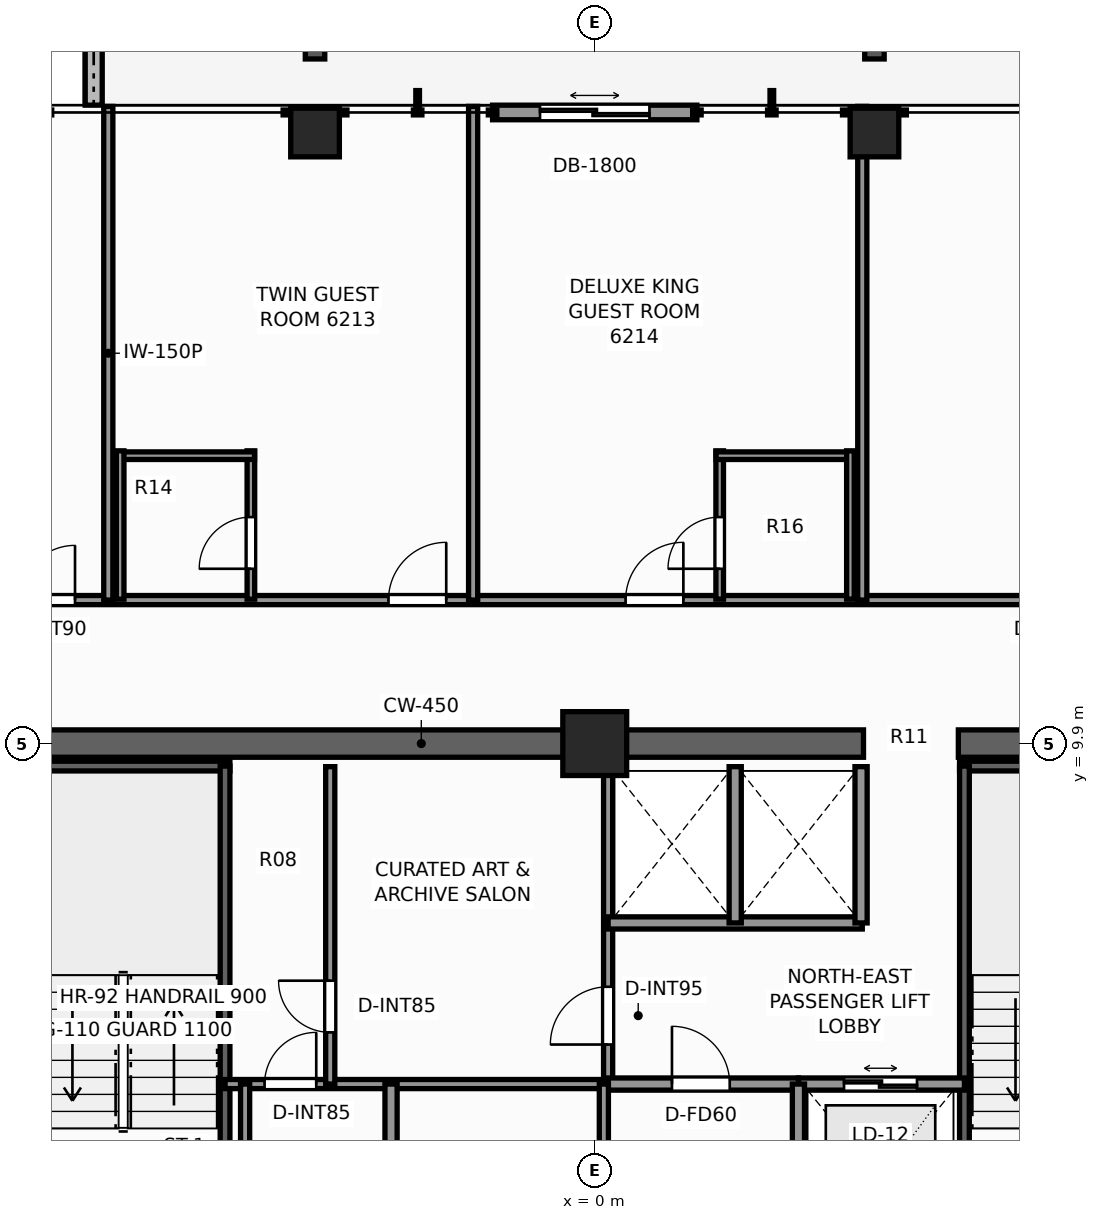
"""IFC4 building model, lengths in metres.
Left out: names, types, materials, properties, quantities, classifications, styles, units other than length and angle.
Written with IfcOpenShell. Run it as: python <this file> out.ifc"""

import sys

from ifc_helpers import new_model, si_unit, direction, frame, frame_2d, origin, origin_2d, place, context, subcontext, project, spatial, rectangle, extrude, element, fill, save


model = new_model("IFC4")
c1 = context("Model", 3, precision=1e-05, world=origin(), true_north=direction((0.0, 1.0)))
c2 = subcontext(c1, "Body", "Model", "MODEL_VIEW")
j1 = project(units=[si_unit("LENGTHUNIT", "METRE"), si_unit("PLANEANGLEUNIT", "RADIAN")], contexts=[c1])
p1 = place(None, origin())
s1 = spatial("IfcSite", under=j1, at=p1, CompositionType="ELEMENT")
p2 = place(p1, origin())
s2 = spatial("IfcBuilding", under=s1, at=p2, CompositionType="ELEMENT")
p3 = place(p2, frame((0.0, 0.0, 213.0)))
s3 = spatial("IfcBuildingStorey", under=s2, at=p3, CompositionType="ELEMENT", Elevation=213.0)
p4 = place(p3, frame((-10.125, 9.9, 0.0), z_axis=(0.0, 0.0, 1.0), x_axis=(1.0, 0.0, 0.0)))
e1 = element("IfcWall", 1, at=p4, inside=s3, PredefinedType="SHEAR", context=c2, shape_type="SweptSolid", body=[
    extrude(rectangle(XDim=14.545, YDim=0.45, at=frame_2d((7.272, 0.0))), origin(), (0.0, 0.0, 1.0), 3.3),
])
p5 = place(p3, frame((5.98, 9.9, 0.0), z_axis=(0.0, 0.0, 1.0), x_axis=(1.0, 0.0, 0.0)))
e2 = element("IfcWall", 2, at=p5, inside=s3, PredefinedType="SHEAR", context=c2, shape_type="SweptSolid", body=[
    extrude(rectangle(XDim=4.145, YDim=0.45, at=frame_2d((2.073, 0.0))), origin(), (0.0, 0.0, 1.0), 3.3),
])
p6 = place(p3, frame((0.0, 9.9, 0.0), z_axis=(0.0, 0.0, 1.0), x_axis=(1.0, 0.0, 0.0)))
e3 = element("IfcColumn", 3, at=p6, inside=s3, PredefinedType="COLUMN", context=c2, shape_type="SweptSolid", body=[
    extrude(rectangle(XDim=1.05, YDim=1.05, at=origin_2d()), origin(), (0.0, 0.0, 1.0), 3.3),
])
for number, where, z_axis, x_axis in (
    (4, (-4.6, 19.95, 0.0), (0.0, 0.0, 1.0), (1.0, 0.0, 0.0)),
    (5, (4.6, 19.95, 0.0), (0.0, 0.0, 1.0), (1.0, 0.0, 0.0)),
):
    element("IfcColumn", number, at=place(p3, frame(where, z_axis=z_axis, x_axis=x_axis)), inside=s3, PredefinedType="COLUMN", context=c2, shape_type="SweptSolid", body=[
        extrude(rectangle(XDim=0.8, YDim=0.8, at=origin_2d()), origin(), (0.0, 0.0, 1.0), 3.3),
    ])
p7 = place(p3, frame((-8.24, 23.375, -0.04), z_axis=(0.0, 0.0, 1.0), x_axis=(0.0, -1.0, 0.0)))
e6 = element("IfcWall", 6, at=p7, inside=s3, PredefinedType="PARAPET", context=c2, shape_type="SweptSolid", body=[
    extrude(rectangle(XDim=2.975, YDim=0.28, at=frame_2d((1.487, 0.0))), origin(), (0.0, 0.0, 1.0), 0.42),
])
p8 = place(p3, frame((-1.68, 20.28, 0.0), z_axis=(0.0, 0.0, 1.0), x_axis=(1.0, 0.0, 0.0)))
e7 = element("IfcWall", 7, at=p8, inside=s3, PredefinedType="STANDARD", context=c2, shape_type="SweptSolid", body=[
    extrude(rectangle(XDim=3.36, YDim=0.24, at=frame_2d((1.68, 0.0))), origin(), (0.0, 0.0, 1.0), 3.08),
])
p9 = place(p8, frame((0.78, 0.0, 0.0)))
e8 = element("IfcOpeningElement", 8, at=p9, cuts=e7, PredefinedType="OPENING", context=c2, shape_type="SweptSolid", body=[
    extrude(rectangle(XDim=1.8, YDim=2.2, at=frame_2d((0.9, 1.1))), frame((0.0, 0.13, 0.0), z_axis=(0.0, -1.0, 0.0), x_axis=(1.0, 0.0, 0.0)), (0.0, 0.0, 1.0), 0.26),
])
p10 = place(p3, frame((-9.52, 9.53, 0.0), z_axis=(0.0, 0.0, 1.0), x_axis=(1.0, 0.0, 0.0)))
e9 = element("IfcWall", 9, at=p10, inside=s3, PredefinedType="SHEAR", context=c2, shape_type="SweptSolid", body=[
    extrude(rectangle(XDim=3.52, YDim=0.16, at=frame_2d((1.76, 0.0))), origin(), (0.0, 0.0, 1.0), 3.3),
])
p11 = place(p3, frame((-6.08, 1.97, 0.0), z_axis=(0.0, 0.0, 1.0), x_axis=(0.0, 1.0, 0.0)))
e10 = element("IfcWall", 10, at=p11, inside=s3, PredefinedType="SHEAR", context=c2, shape_type="SweptSolid", body=[
    extrude(rectangle(XDim=7.56, YDim=0.16, at=frame_2d((3.78, 0.0))), origin(), (0.0, 0.0, 1.0), 3.3),
])
p12 = place(p3, frame((6.0, 9.53, 0.0), z_axis=(0.0, 0.0, 1.0), x_axis=(1.0, 0.0, 0.0)))
e11 = element("IfcWall", 11, at=p12, inside=s3, PredefinedType="SHEAR", context=c2, shape_type="SweptSolid", body=[
    extrude(rectangle(XDim=3.52, YDim=0.16, at=frame_2d((1.76, 0.0))), origin(), (0.0, 0.0, 1.0), 3.3),
])
p13 = place(p3, frame((6.08, 1.97, 0.0), z_axis=(0.0, 0.0, 1.0), x_axis=(0.0, 1.0, 0.0)))
e12 = element("IfcWall", 12, at=p13, inside=s3, PredefinedType="SHEAR", context=c2, shape_type="SweptSolid", body=[
    extrude(rectangle(XDim=7.56, YDim=0.16, at=frame_2d((3.78, 0.0))), origin(), (0.0, 0.0, 1.0), 3.3),
])
p14 = place(p3, frame((3.35, 4.3, 0.0), z_axis=(0.0, 0.0, 1.0), x_axis=(1.0, 0.0, 0.0)))
e13 = element("IfcWall", 13, at=p14, inside=s3, PredefinedType="SOLIDWALL", context=c2, shape_type="SweptSolid", body=[
    extrude(rectangle(XDim=2.73, YDim=0.2, at=frame_2d((1.365, 0.0))), origin(), (0.0, 0.0, 1.0), 3.08),
])
p15 = place(p14, frame((0.75, 0.0, 0.0)))
e14 = element("IfcOpeningElement", 14, at=p15, cuts=e13, PredefinedType="OPENING", context=c2, shape_type="SweptSolid", body=[
    extrude(rectangle(XDim=1.2, YDim=2.25, at=frame_2d((0.6, 1.125))), frame((0.0, 0.11, 0.0), z_axis=(0.0, -1.0, 0.0), x_axis=(1.0, 0.0, 0.0)), (0.0, 0.0, 1.0), 0.22),
])
p16 = place(p3, frame((-6.08, 4.3, 0.0), z_axis=(0.0, 0.0, 1.0), x_axis=(1.0, 0.0, 0.0)))
e15 = element("IfcWall", 15, at=p16, inside=s3, PredefinedType="PARTITIONING", context=c2, shape_type="SweptSolid", body=[
    extrude(rectangle(XDim=6.3, YDim=0.15, at=frame_2d((3.15, 0.0))), origin(), (0.0, 0.0, 1.0), 3.08),
])
p17 = place(p16, frame((0.65, 0.0, 0.0)))
e16 = element("IfcOpeningElement", 16, at=p17, cuts=e15, PredefinedType="OPENING", context=c2, shape_type="SweptSolid", body=[
    extrude(rectangle(XDim=0.85, YDim=2.03, at=frame_2d((0.425, 1.015))), frame((0.0, 0.085, 0.0), z_axis=(0.0, -1.0, 0.0), x_axis=(1.0, 0.0, 0.0)), (0.0, 0.0, 1.0), 0.17),
])
p18 = place(p3, frame((0.22, 4.3, 0.0), z_axis=(0.0, 0.0, 1.0), x_axis=(0.0, 1.0, 0.0)))
e17 = element("IfcWall", 17, at=p18, inside=s3, PredefinedType="PARTITIONING", context=c2, shape_type="SweptSolid", body=[
    extrude(rectangle(XDim=5.22, YDim=0.15, at=frame_2d((2.61, 0.0))), origin(), (0.0, 0.0, 1.0), 3.08),
])
p19 = place(p18, frame((0.65, 0.0, 0.0)))
e18 = element("IfcOpeningElement", 18, at=p19, cuts=e17, PredefinedType="OPENING", context=c2, shape_type="SweptSolid", body=[
    extrude(rectangle(XDim=0.95, YDim=2.06, at=frame_2d((0.475, 1.03))), frame((0.0, 0.085, 0.0), z_axis=(0.0, -1.0, 0.0), x_axis=(1.0, 0.0, 0.0)), (0.0, 0.0, 1.0), 0.17),
])
p20 = place(p3, frame((-4.35, 4.3, 0.0), z_axis=(0.0, 0.0, 1.0), x_axis=(0.0, 1.0, 0.0)))
e19 = element("IfcWall", 19, at=p20, inside=s3, PredefinedType="PARTITIONING", context=c2, shape_type="SweptSolid", body=[
    extrude(rectangle(XDim=5.22, YDim=0.15, at=frame_2d((2.61, 0.0))), origin(), (0.0, 0.0, 1.0), 3.08),
])
p21 = place(p20, frame((0.85, 0.0, 0.0)))
e20 = element("IfcOpeningElement", 20, at=p21, cuts=e19, PredefinedType="OPENING", context=c2, shape_type="SweptSolid", body=[
    extrude(rectangle(XDim=0.85, YDim=2.03, at=frame_2d((0.425, 1.015))), frame((0.0, 0.085, 0.0), z_axis=(0.0, -1.0, 0.0), x_axis=(1.0, 0.0, 0.0)), (0.0, 0.0, 1.0), 0.17),
])
p22 = place(p3, frame((0.22, 6.95, 0.0), z_axis=(0.0, 0.0, 1.0), x_axis=(1.0, 0.0, 0.0)))
e21 = element("IfcWall", 21, at=p22, inside=s3, PredefinedType="SOLIDWALL", context=c2, shape_type="SweptSolid", body=[
    extrude(rectangle(XDim=4.18, YDim=0.2, at=frame_2d((2.09, 0.0))), origin(), (0.0, 0.0, 1.0), 3.08),
])
for number, where, z_axis, x_axis in (
    (22, (4.38, 6.95, 0.0), (0.0, 0.0, 1.0), (0.0, 1.0, 0.0)),
    (23, (2.31, 6.95, 0.0), (0.0, 0.0, 1.0), (0.0, 1.0, 0.0)),
):
    element("IfcWall", number, at=place(p3, frame(where, z_axis=z_axis, x_axis=x_axis)), inside=s3, PredefinedType="SOLIDWALL", context=c2, shape_type="SweptSolid", body=[
        extrude(rectangle(XDim=2.57, YDim=0.2, at=frame_2d((1.285, 0.0))), origin(), (0.0, 0.0, 1.0), 3.08),
    ])
p23 = place(p3, frame((0.22, 4.3, 0.0), z_axis=(0.0, 0.0, 1.0), x_axis=(1.0, 0.0, 0.0)))
e24 = element("IfcWall", 24, at=p23, inside=s3, PredefinedType="SOLIDWALL", context=c2, shape_type="SweptSolid", body=[
    extrude(rectangle(XDim=3.13, YDim=0.2, at=frame_2d((1.565, 0.0))), origin(), (0.0, 0.0, 1.0), 3.08),
])
p24 = place(p23, frame((1.05, 0.0, 0.0)))
e25 = element("IfcOpeningElement", 25, at=p24, cuts=e24, PredefinedType="OPENING", context=c2, shape_type="SweptSolid", body=[
    extrude(rectangle(XDim=0.95, YDim=2.06, at=frame_2d((0.475, 1.03))), frame((0.0, 0.11, 0.0), z_axis=(0.0, -1.0, 0.0), x_axis=(1.0, 0.0, 0.0)), (0.0, 0.0, 1.0), 0.22),
])
for number, where, z_axis, x_axis in (
    (26, (-3.35, 1.1, 0.0), (0.0, 0.0, 1.0), (0.0, 1.0, 0.0)),
    (27, (3.35, 1.1, 0.0), (0.0, 0.0, 1.0), (0.0, 1.0, 0.0)),
):
    element("IfcWall", number, at=place(p3, frame(where, z_axis=z_axis, x_axis=x_axis)), inside=s3, PredefinedType="SOLIDWALL", context=c2, shape_type="SweptSolid", body=[
        extrude(rectangle(XDim=3.2, YDim=0.2, at=frame_2d((1.6, 0.0))), origin(), (0.0, 0.0, 1.0), 3.08),
    ])
p25 = place(p3, frame((0.15, -1.7, 0.0), z_axis=(0.0, 0.0, 1.0), x_axis=(0.0, 1.0, 0.0)))
e28 = element("IfcWall", 28, at=p25, inside=s3, PredefinedType="PARTITIONING", context=c2, shape_type="SweptSolid", body=[
    extrude(rectangle(XDim=6.0, YDim=0.15, at=frame_2d((3.0, 0.0))), origin(), (0.0, 0.0, 1.0), 3.08),
])
p26 = place(p25, frame((3.6, 0.0, 0.0)))
e29 = element("IfcOpeningElement", 29, at=p26, cuts=e28, PredefinedType="OPENING", context=c2, shape_type="SweptSolid", body=[
    extrude(rectangle(XDim=0.85, YDim=2.03, at=frame_2d((0.425, 1.015))), frame((0.0, 0.085, 0.0), z_axis=(0.0, -1.0, 0.0), x_axis=(1.0, 0.0, 0.0)), (0.0, 0.0, 1.0), 0.17),
])
p27 = place(p3, frame((-5.75, 1.97, 0.0), z_axis=(0.0, 0.0, 1.0), x_axis=(0.0, 1.0, 0.0)))
e30 = element("IfcWall", 30, at=p27, inside=s3, PredefinedType="PARTITIONING", context=c2, shape_type="SweptSolid", body=[
    extrude(rectangle(XDim=2.33, YDim=0.15, at=frame_2d((1.165, 0.0))), origin(), (0.0, 0.0, 1.0), 3.08),
])
p28 = place(p3, frame((-12.58, 12.26, 0.0), z_axis=(0.0, 0.0, 1.0), x_axis=(1.0, 0.0, 0.0)))
e31 = element("IfcWall", 31, at=p28, inside=s3, PredefinedType="PARTITIONING", context=c2, shape_type="SweptSolid", body=[
    extrude(rectangle(XDim=25.16, YDim=0.15, at=frame_2d((12.58, 0.0))), origin(), (0.0, 0.0, 1.0), 2.369),
])
p29 = place(p28, frame((3.133, 0.0, 0.0)))
e32 = element("IfcOpeningElement", 32, at=p29, cuts=e31, PredefinedType="OPENING", context=c2, shape_type="SweptSolid", body=[
    extrude(rectangle(XDim=0.9, YDim=2.06, at=frame_2d((0.45, 1.03))), frame((0.0, 0.085, 0.0), z_axis=(0.0, -1.0, 0.0), x_axis=(1.0, 0.0, 0.0)), (0.0, 0.0, 1.0), 0.17),
])
p30 = place(p28, frame((9.188, 0.0, 0.0)))
e33 = element("IfcOpeningElement", 33, at=p30, cuts=e31, PredefinedType="OPENING", context=c2, shape_type="SweptSolid", body=[
    extrude(rectangle(XDim=0.95, YDim=2.06, at=frame_2d((0.475, 1.03))), frame((0.0, 0.085, 0.0), z_axis=(0.0, -1.0, 0.0), x_axis=(1.0, 0.0, 0.0)), (0.0, 0.0, 1.0), 0.17),
])
p31 = place(p28, frame((13.087, 0.0, 0.0)))
e34 = element("IfcOpeningElement", 34, at=p31, cuts=e31, PredefinedType="OPENING", context=c2, shape_type="SweptSolid", body=[
    extrude(rectangle(XDim=0.95, YDim=2.06, at=frame_2d((0.475, 1.03))), frame((0.0, 0.085, 0.0), z_axis=(0.0, -1.0, 0.0), x_axis=(1.0, 0.0, 0.0)), (0.0, 0.0, 1.0), 0.17),
])
p32 = place(p28, frame((19.665, 0.0, 0.0)))
e35 = element("IfcOpeningElement", 35, at=p32, cuts=e31, PredefinedType="OPENING", context=c2, shape_type="SweptSolid", body=[
    extrude(rectangle(XDim=0.9, YDim=2.06, at=frame_2d((0.45, 1.03))), frame((0.0, 0.085, 0.0), z_axis=(0.0, -1.0, 0.0), x_axis=(1.0, 0.0, 0.0)), (0.0, 0.0, 1.0), 0.17),
])
for number, where, z_axis, x_axis in (
    (36, (-8.0, 12.26, 0.0), (0.0, 0.0, 1.0), (0.0, 1.0, 0.0)),
    (37, (-2.0, 12.26, 0.0), (0.0, 0.0, 1.0), (0.0, 1.0, 0.0)),
):
    element("IfcWall", number, at=place(p3, frame(where, z_axis=z_axis, x_axis=x_axis)), inside=s3, PredefinedType="PARTITIONING", context=c2, shape_type="SweptSolid", body=[
        extrude(rectangle(XDim=8.12, YDim=0.15, at=frame_2d((4.06, 0.0))), origin(), (0.0, 0.0, 1.0), 2.453),
    ])
p33 = place(p3, frame((-5.655, 12.275, 0.0), z_axis=(0.0, 0.0, 1.0), x_axis=(0.0, 1.0, 0.0)))
e38 = element("IfcWall", 38, at=p33, inside=s3, PredefinedType="PARTITIONING", context=c2, shape_type="SweptSolid", body=[
    extrude(rectangle(XDim=2.44, YDim=0.125, at=frame_2d((1.22, 0.0))), origin(), (0.0, 0.0, 1.0), 3.08),
])
p34 = place(p33, frame((0.5, 0.0, 0.0)))
e39 = element("IfcOpeningElement", 39, at=p34, cuts=e38, PredefinedType="OPENING", context=c2, shape_type="SweptSolid", body=[
    extrude(rectangle(XDim=0.85, YDim=2.03, at=frame_2d((0.425, 1.015))), frame((0.0, 0.073, 0.0), z_axis=(0.0, -1.0, 0.0), x_axis=(1.0, 0.0, 0.0)), (0.0, 0.0, 1.0), 0.145),
])
p35 = place(p3, frame((-7.865, 14.635, 0.0), z_axis=(0.0, 0.0, 1.0), x_axis=(1.0, 0.0, 0.0)))
e40 = element("IfcWall", 40, at=p35, inside=s3, PredefinedType="PARTITIONING", context=c2, shape_type="SweptSolid", body=[
    extrude(rectangle(XDim=2.27, YDim=0.125, at=frame_2d((1.135, 0.0))), origin(), (0.0, 0.0, 1.0), 3.08),
])
p36 = place(p3, frame((-7.805, 12.275, 0.0), z_axis=(0.0, 0.0, 1.0), x_axis=(0.0, 1.0, 0.0)))
e41 = element("IfcWall", 41, at=p36, inside=s3, PredefinedType="PARTITIONING", context=c2, shape_type="SweptSolid", body=[
    extrude(rectangle(XDim=2.44, YDim=0.125, at=frame_2d((1.22, 0.0))), origin(), (0.0, 0.0, 1.0), 3.08),
])
p37 = place(p3, frame((4.4, 12.26, 0.0), z_axis=(0.0, 0.0, 1.0), x_axis=(0.0, 1.0, 0.0)))
e42 = element("IfcWall", 42, at=p37, inside=s3, PredefinedType="PARTITIONING", context=c2, shape_type="SweptSolid", body=[
    extrude(rectangle(XDim=8.12, YDim=0.15, at=frame_2d((4.06, 0.0))), origin(), (0.0, 0.0, 1.0), 2.369),
])
p38 = place(p3, frame((2.055, 12.275, 0.0), z_axis=(0.0, 0.0, 1.0), x_axis=(0.0, 1.0, 0.0)))
e43 = element("IfcWall", 43, at=p38, inside=s3, PredefinedType="PARTITIONING", context=c2, shape_type="SweptSolid", body=[
    extrude(rectangle(XDim=2.44, YDim=0.125, at=frame_2d((1.22, 0.0))), origin(), (0.0, 0.0, 1.0), 3.08),
])
p39 = place(p38, frame((0.5, 0.0, 0.0)))
e44 = element("IfcOpeningElement", 44, at=p39, cuts=e43, PredefinedType="OPENING", context=c2, shape_type="SweptSolid", body=[
    extrude(rectangle(XDim=0.85, YDim=2.03, at=frame_2d((0.425, 1.015))), frame((0.0, 0.073, 0.0), z_axis=(0.0, -1.0, 0.0), x_axis=(1.0, 0.0, 0.0)), (0.0, 0.0, 1.0), 0.145),
])
p40 = place(p3, frame((1.995, 14.635, 0.0), z_axis=(0.0, 0.0, 1.0), x_axis=(1.0, 0.0, 0.0)))
e45 = element("IfcWall", 45, at=p40, inside=s3, PredefinedType="PARTITIONING", context=c2, shape_type="SweptSolid", body=[
    extrude(rectangle(XDim=2.27, YDim=0.125, at=frame_2d((1.135, 0.0))), origin(), (0.0, 0.0, 1.0), 3.08),
])
p41 = place(p3, frame((4.205, 12.275, 0.0), z_axis=(0.0, 0.0, 1.0), x_axis=(0.0, 1.0, 0.0)))
e46 = element("IfcWall", 46, at=p41, inside=s3, PredefinedType="PARTITIONING", context=c2, shape_type="SweptSolid", body=[
    extrude(rectangle(XDim=2.44, YDim=0.125, at=frame_2d((1.22, 0.0))), origin(), (0.0, 0.0, 1.0), 3.08),
])
p42 = place(p9, origin())
e47 = element("IfcDoor", 47, at=p42, inside=s3, OperationType="DOUBLE_DOOR_SLIDING", PredefinedType="DOOR", context=c2, shape_type="SweptSolid", body=[
    extrude(rectangle(XDim=1.8, YDim=2.2, at=frame_2d((0.9, 1.1))), frame((0.0, 0.025, 0.0), z_axis=(0.0, -1.0, 0.0), x_axis=(1.0, 0.0, 0.0)), (0.0, 0.0, 1.0), 0.05),
])
fill(e8, e47)
p43 = place(p15, origin())
e48 = element("IfcDoor", 48, at=p43, inside=s3, OperationType="DOUBLE_DOOR_SLIDING", PredefinedType="DOOR", context=c2, shape_type="SweptSolid", body=[
    extrude(rectangle(XDim=1.2, YDim=2.25, at=frame_2d((0.6, 1.125))), frame((0.0, 0.025, 0.0), z_axis=(0.0, -1.0, 0.0), x_axis=(1.0, 0.0, 0.0)), (0.0, 0.0, 1.0), 0.05),
])
fill(e14, e48)
p44 = place(p19, origin())
e49 = element("IfcDoor", 49, at=p44, inside=s3, OperationType="SINGLE_SWING_LEFT", PredefinedType="DOOR", context=c2, shape_type="SweptSolid", body=[
    extrude(rectangle(XDim=0.95, YDim=2.06, at=frame_2d((0.475, 1.03))), frame((0.0, 0.025, 0.0), z_axis=(0.0, -1.0, 0.0), x_axis=(1.0, 0.0, 0.0)), (0.0, 0.0, 1.0), 0.05),
])
fill(e18, e49)
p45 = place(p21, origin())
e50 = element("IfcDoor", 50, at=p45, inside=s3, OperationType="SINGLE_SWING_RIGHT", PredefinedType="DOOR", context=c2, shape_type="SweptSolid", body=[
    extrude(rectangle(XDim=0.85, YDim=2.03, at=frame_2d((0.425, 1.015))), frame((0.0, 0.025, 0.0), z_axis=(0.0, -1.0, 0.0), x_axis=(1.0, 0.0, 0.0)), (0.0, 0.0, 1.0), 0.05),
])
fill(e20, e50)
p46 = place(p24, origin())
e51 = element("IfcDoor", 51, at=p46, inside=s3, OperationType="SINGLE_SWING_LEFT", PredefinedType="DOOR", context=c2, shape_type="SweptSolid", body=[
    extrude(rectangle(XDim=0.95, YDim=2.06, at=frame_2d((0.475, 1.03))), frame((0.0, 0.025, 0.0), z_axis=(0.0, -1.0, 0.0), x_axis=(1.0, 0.0, 0.0)), (0.0, 0.0, 1.0), 0.05),
])
fill(e25, e51)
p47 = place(p17, origin())
e52 = element("IfcDoor", 52, at=p47, inside=s3, OperationType="SINGLE_SWING_RIGHT", PredefinedType="DOOR", context=c2, shape_type="SweptSolid", body=[
    extrude(rectangle(XDim=0.85, YDim=2.03, at=frame_2d((0.425, 1.015))), frame((0.0, 0.025, 0.0), z_axis=(0.0, -1.0, 0.0), x_axis=(1.0, 0.0, 0.0)), (0.0, 0.0, 1.0), 0.05),
])
fill(e16, e52)
p48 = place(p29, origin())
e53 = element("IfcDoor", 53, at=p48, inside=s3, OperationType="SINGLE_SWING_RIGHT", PredefinedType="DOOR", context=c2, shape_type="SweptSolid", body=[
    extrude(rectangle(XDim=0.9, YDim=2.06, at=frame_2d((0.45, 1.03))), frame((0.0, 0.025, 0.0), z_axis=(0.0, -1.0, 0.0), x_axis=(1.0, 0.0, 0.0)), (0.0, 0.0, 1.0), 0.05),
])
fill(e32, e53)
p49 = place(p34, origin())
e54 = element("IfcDoor", 54, at=p49, inside=s3, OperationType="SINGLE_SWING_LEFT", PredefinedType="DOOR", context=c2, shape_type="SweptSolid", body=[
    extrude(rectangle(XDim=0.85, YDim=2.03, at=frame_2d((0.425, 1.015))), frame((0.0, 0.025, 0.0), z_axis=(0.0, -1.0, 0.0), x_axis=(1.0, 0.0, 0.0)), (0.0, 0.0, 1.0), 0.05),
])
fill(e39, e54)
p50 = place(p30, origin())
e55 = element("IfcDoor", 55, at=p50, inside=s3, OperationType="SINGLE_SWING_RIGHT", PredefinedType="DOOR", context=c2, shape_type="SweptSolid", body=[
    extrude(rectangle(XDim=0.95, YDim=2.06, at=frame_2d((0.475, 1.03))), frame((0.0, 0.025, 0.0), z_axis=(0.0, -1.0, 0.0), x_axis=(1.0, 0.0, 0.0)), (0.0, 0.0, 1.0), 0.05),
])
fill(e33, e55)
p51 = place(p39, origin())
e56 = element("IfcDoor", 56, at=p51, inside=s3, OperationType="SINGLE_SWING_LEFT", PredefinedType="DOOR", context=c2, shape_type="SweptSolid", body=[
    extrude(rectangle(XDim=0.85, YDim=2.03, at=frame_2d((0.425, 1.015))), frame((0.0, 0.025, 0.0), z_axis=(0.0, -1.0, 0.0), x_axis=(1.0, 0.0, 0.0)), (0.0, 0.0, 1.0), 0.05),
])
fill(e44, e56)
p52 = place(p31, origin())
e57 = element("IfcDoor", 57, at=p52, inside=s3, OperationType="SINGLE_SWING_RIGHT", PredefinedType="DOOR", context=c2, shape_type="SweptSolid", body=[
    extrude(rectangle(XDim=0.95, YDim=2.06, at=frame_2d((0.475, 1.03))), frame((0.0, 0.025, 0.0), z_axis=(0.0, -1.0, 0.0), x_axis=(1.0, 0.0, 0.0)), (0.0, 0.0, 1.0), 0.05),
])
fill(e34, e57)
save(model, sys.argv[1])
